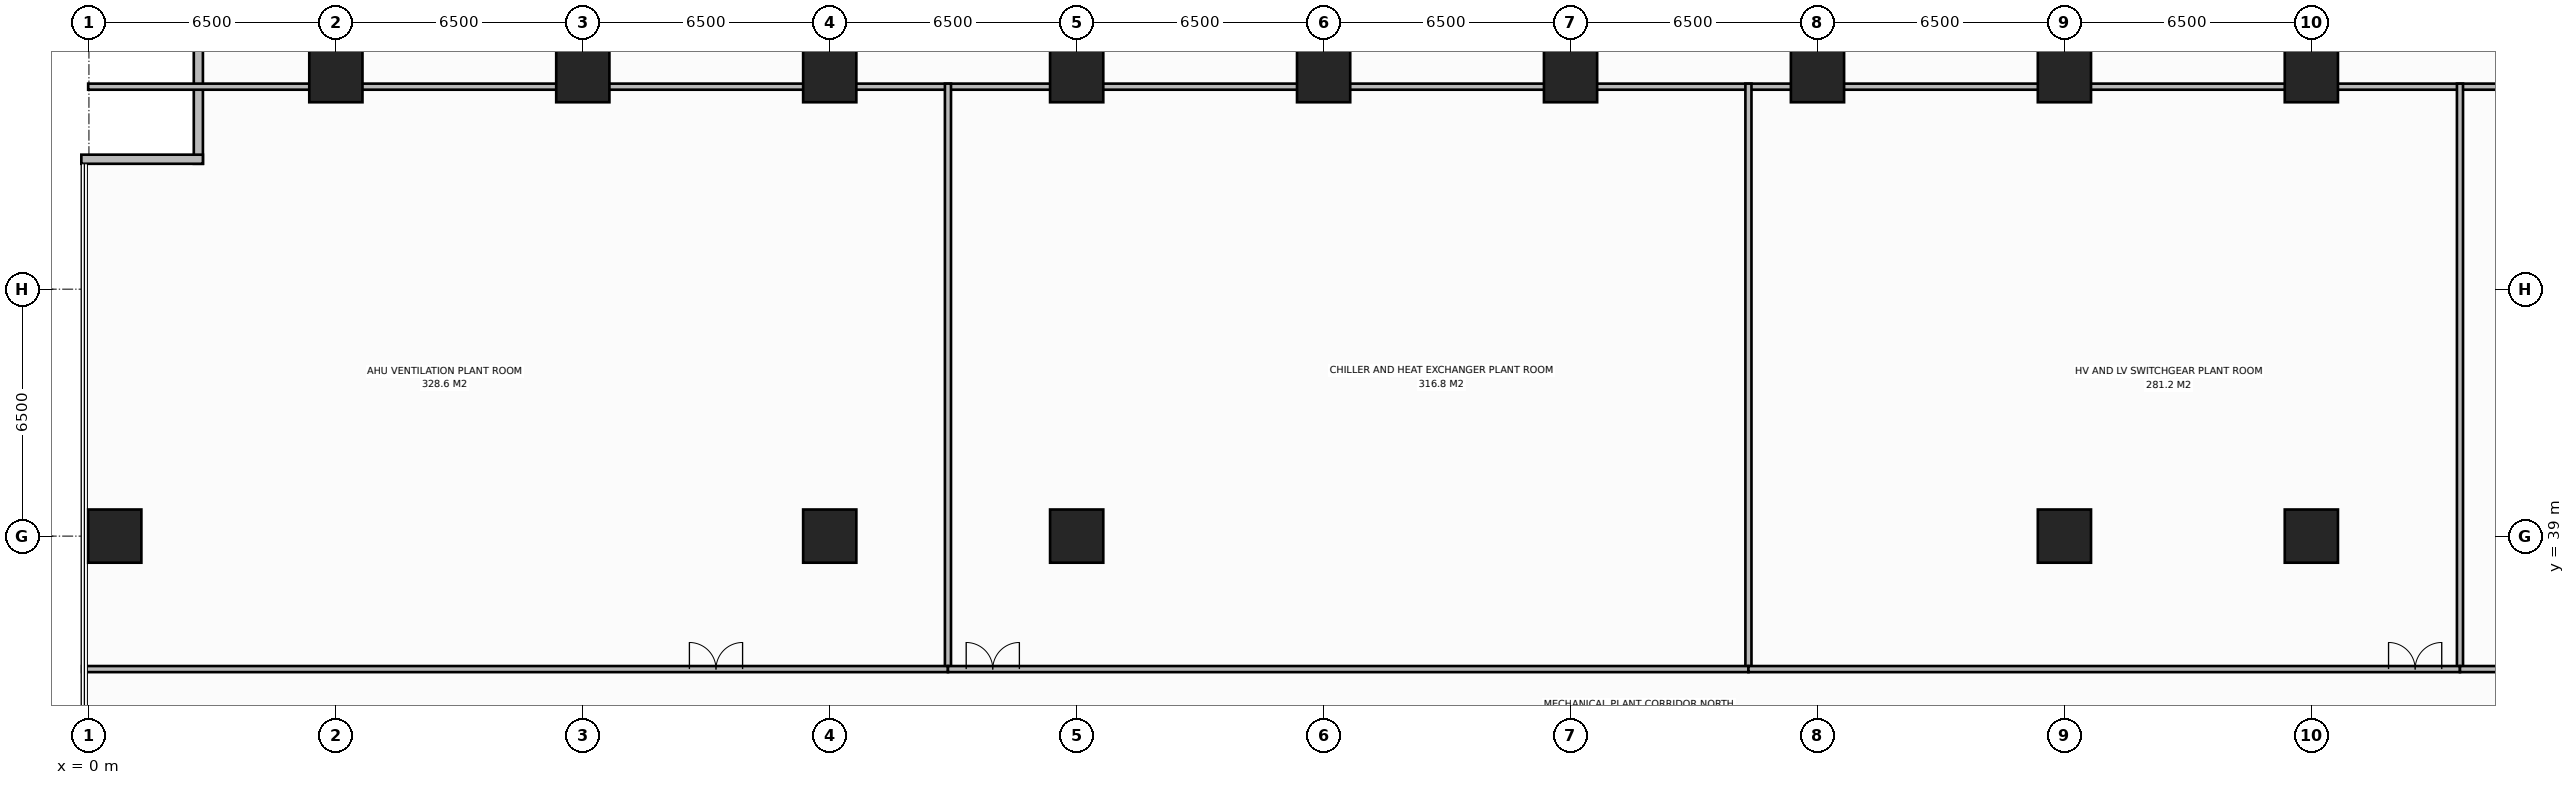
"""IFC4 building model, lengths in metres.
Left out: names, types, materials, properties, quantities, classifications, styles, units other than length and angle.
Written with IfcOpenShell. Run it as: python <this file> out.ifc"""

import sys

from ifc_helpers import new_model, si_unit, direction, frame, frame_2d, origin, origin_2d, place, context, subcontext, project, spatial, rectangle, extrude, element, fill, save


model = new_model("IFC4")
c1 = context("Model", 3, precision=1e-05, world=origin(), true_north=direction((0.0, 1.0)))
c2 = subcontext(c1, "Body", "Model", "MODEL_VIEW")
j1 = project(units=[si_unit("LENGTHUNIT", "METRE"), si_unit("PLANEANGLEUNIT", "RADIAN")], contexts=[c1])
p1 = place(None, origin())
s1 = spatial("IfcSite", under=j1, at=p1, CompositionType="ELEMENT")
p2 = place(p1, origin())
s2 = spatial("IfcBuilding", under=s1, at=p2, CompositionType="ELEMENT")
p3 = place(p2, frame((0.0, 0.0, 81.0)))
s3 = spatial("IfcBuildingStorey", under=s2, at=p3, CompositionType="ELEMENT", Elevation=81.0)
for number, where, z_axis, x_axis in (
    (1, (19.5, 39.0, 0.0), (0.0, 0.0, 1.0), (1.0, 0.0, 0.0)),
    (2, (58.5, 39.0, 0.0), (0.0, 0.0, 1.0), (1.0, 0.0, 0.0)),
    (3, (26.0, 39.0, 0.0), (0.0, 0.0, 1.0), (1.0, 0.0, 0.0)),
    (4, (52.0, 39.0, 0.0), (0.0, 0.0, 1.0), (1.0, 0.0, 0.0)),
    (5, (6.5, 51.12, 0.0), (0.0, 0.0, 1.0), (1.0, 0.0, 0.0)),
    (6, (13.0, 51.12, 0.0), (0.0, 0.0, 1.0), (1.0, 0.0, 0.0)),
    (7, (19.5, 51.12, 0.0), (0.0, 0.0, 1.0), (1.0, 0.0, 0.0)),
    (8, (26.0, 51.12, 0.0), (0.0, 0.0, 1.0), (1.0, 0.0, 0.0)),
    (9, (32.5, 51.12, 0.0), (0.0, 0.0, 1.0), (1.0, 0.0, 0.0)),
    (10, (39.0, 51.12, 0.0), (0.0, 0.0, 1.0), (1.0, 0.0, 0.0)),
    (11, (45.5, 51.12, 0.0), (0.0, 0.0, 1.0), (1.0, 0.0, 0.0)),
    (12, (52.0, 51.12, 0.0), (0.0, 0.0, 1.0), (1.0, 0.0, 0.0)),
    (13, (58.5, 51.12, 0.0), (0.0, 0.0, 1.0), (1.0, 0.0, 0.0)),
    (14, (0.68, 39.0, 0.0), (0.0, 0.0, 1.0), (1.0, 0.0, 0.0)),
):
    element("IfcColumn", number, at=place(p3, frame(where, z_axis=z_axis, x_axis=x_axis)), inside=s3, PredefinedType="COLUMN", context=c2, shape_type="SweptSolid", body=[
        extrude(rectangle(XDim=1.4, YDim=1.4, at=origin_2d()), origin(), (0.0, 0.0, 1.0), 5.0),
    ])
for number, where, z_axis, x_axis in (
    (15, (2.88, 48.8, 0.0), (0.0, 0.0, 1.0), (0.0, 1.0, 0.0)),
    (16, (-0.2, 48.92, 0.0), (0.0, 0.0, 1.0), (1.0, 0.0, 0.0)),
):
    element("IfcWall", number, at=place(p3, frame(where, z_axis=z_axis, x_axis=x_axis)), inside=s3, PredefinedType="STANDARD", context=c2, shape_type="SweptSolid", body=[
        extrude(rectangle(XDim=3.2, YDim=0.24, at=frame_2d((1.6, 0.0))), origin(), (0.0, 0.0, 1.0), 4.765),
    ])
p4 = place(p3, frame((-0.02, 50.83, 0.0), z_axis=(0.0, 0.0, 1.0), x_axis=(1.0, 0.0, 0.0)))
e17 = element("IfcWall", 17, at=p4, inside=s3, PredefinedType="STANDARD", context=c2, shape_type="SweptSolid", body=[
    extrude(rectangle(XDim=78.04, YDim=0.16, at=frame_2d((39.02, 0.0))), origin(), (0.0, 0.0, 1.0), 4.765),
])
p5 = place(p3, frame((22.612, 35.5, 0.0), z_axis=(0.0, 0.0, 1.0), x_axis=(0.0, 1.0, 0.0)))
e18 = element("IfcWall", 18, at=p5, inside=s3, PredefinedType="STANDARD", context=c2, shape_type="SweptSolid", body=[
    extrude(rectangle(XDim=15.41, YDim=0.16, at=frame_2d((7.705, 0.0))), origin(), (0.0, 0.0, 1.0), 4.765),
])
p6 = place(p3, frame((-0.18, 35.5, 0.0), z_axis=(0.0, 0.0, 1.0), x_axis=(1.0, 0.0, 0.0)))
e19 = element("IfcWall", 19, at=p6, inside=s3, PredefinedType="STANDARD", context=c2, shape_type="SweptSolid", body=[
    extrude(rectangle(XDim=22.792, YDim=0.16, at=frame_2d((11.396, 0.0))), origin(), (0.0, 0.0, 1.0), 4.765),
])
p7 = place(p6, frame((15.986, 0.0, 0.0)))
e20 = element("IfcOpeningElement", 20, at=p7, cuts=e19, PredefinedType="OPENING", context=c2, shape_type="SweptSolid", body=[
    extrude(rectangle(XDim=1.4, YDim=2.2, at=frame_2d((0.7, 1.1))), frame((0.0, 0.09, 0.0), z_axis=(0.0, -1.0, 0.0), x_axis=(1.0, 0.0, 0.0)), (0.0, 0.0, 1.0), 0.18),
])
p8 = place(p3, frame((43.682, 35.5, 0.0), z_axis=(0.0, 0.0, 1.0), x_axis=(0.0, 1.0, 0.0)))
e21 = element("IfcWall", 21, at=p8, inside=s3, PredefinedType="STANDARD", context=c2, shape_type="SweptSolid", body=[
    extrude(rectangle(XDim=15.41, YDim=0.16, at=frame_2d((7.705, 0.0))), origin(), (0.0, 0.0, 1.0), 4.765),
])
p9 = place(p3, frame((22.612, 35.5, 0.0), z_axis=(0.0, 0.0, 1.0), x_axis=(1.0, 0.0, 0.0)))
e22 = element("IfcWall", 22, at=p9, inside=s3, PredefinedType="STANDARD", context=c2, shape_type="SweptSolid", body=[
    extrude(rectangle(XDim=21.071, YDim=0.16, at=frame_2d((10.535, 0.0))), origin(), (0.0, 0.0, 1.0), 4.765),
])
p10 = place(p9, frame((0.48, 0.0, 0.0)))
e23 = element("IfcOpeningElement", 23, at=p10, cuts=e22, PredefinedType="OPENING", context=c2, shape_type="SweptSolid", body=[
    extrude(rectangle(XDim=1.4, YDim=2.2, at=frame_2d((0.7, 1.1))), frame((0.0, 0.09, 0.0), z_axis=(0.0, -1.0, 0.0), x_axis=(1.0, 0.0, 0.0)), (0.0, 0.0, 1.0), 0.18),
])
p11 = place(p3, frame((62.412, 35.5, 0.0), z_axis=(0.0, 0.0, 1.0), x_axis=(0.0, 1.0, 0.0)))
e24 = element("IfcWall", 24, at=p11, inside=s3, PredefinedType="STANDARD", context=c2, shape_type="SweptSolid", body=[
    extrude(rectangle(XDim=15.41, YDim=0.16, at=frame_2d((7.705, 0.0))), origin(), (0.0, 0.0, 1.0), 4.765),
])
p12 = place(p3, frame((43.682, 35.5, 0.0), z_axis=(0.0, 0.0, 1.0), x_axis=(1.0, 0.0, 0.0)))
e25 = element("IfcWall", 25, at=p12, inside=s3, PredefinedType="STANDARD", context=c2, shape_type="SweptSolid", body=[
    extrude(rectangle(XDim=18.73, YDim=0.16, at=frame_2d((9.365, 0.0))), origin(), (0.0, 0.0, 1.0), 4.765),
])
p13 = place(p12, frame((16.85, 0.0, 0.0)))
e26 = element("IfcOpeningElement", 26, at=p13, cuts=e25, PredefinedType="OPENING", context=c2, shape_type="SweptSolid", body=[
    extrude(rectangle(XDim=1.4, YDim=2.2, at=frame_2d((0.7, 1.1))), frame((0.0, 0.09, 0.0), z_axis=(0.0, -1.0, 0.0), x_axis=(1.0, 0.0, 0.0)), (0.0, 0.0, 1.0), 0.18),
])
p14 = place(p3, frame((62.412, 35.5, 0.0), z_axis=(0.0, 0.0, 1.0), x_axis=(1.0, 0.0, 0.0)))
e27 = element("IfcWall", 27, at=p14, inside=s3, PredefinedType="STANDARD", context=c2, shape_type="SweptSolid", body=[
    extrude(rectangle(XDim=15.768, YDim=0.16, at=frame_2d((7.884, 0.0))), origin(), (0.0, 0.0, 1.0), 4.765),
])
p15 = place(p14, frame((1.894, 0.0, 0.0)))
e28 = element("IfcOpeningElement", 28, at=p15, cuts=e27, PredefinedType="OPENING", context=c2, shape_type="SweptSolid", body=[
    extrude(rectangle(XDim=1.4, YDim=2.2, at=frame_2d((0.7, 1.1))), frame((0.0, 0.09, 0.0), z_axis=(0.0, -1.0, 0.0), x_axis=(1.0, 0.0, 0.0)), (0.0, 0.0, 1.0), 0.18),
])
p16 = place(p7, origin())
e29 = element("IfcDoor", 29, at=p16, inside=s3, OperationType="DOUBLE_DOOR_SINGLE_SWING", PredefinedType="DOOR", context=c2, shape_type="SweptSolid", body=[
    extrude(rectangle(XDim=1.4, YDim=2.2, at=frame_2d((0.7, 1.1))), frame((0.0, 0.025, 0.0), z_axis=(0.0, -1.0, 0.0), x_axis=(1.0, 0.0, 0.0)), (0.0, 0.0, 1.0), 0.05),
])
fill(e20, e29)
p17 = place(p10, origin())
e30 = element("IfcDoor", 30, at=p17, inside=s3, OperationType="DOUBLE_DOOR_SINGLE_SWING", PredefinedType="DOOR", context=c2, shape_type="SweptSolid", body=[
    extrude(rectangle(XDim=1.4, YDim=2.2, at=frame_2d((0.7, 1.1))), frame((0.0, 0.025, 0.0), z_axis=(0.0, -1.0, 0.0), x_axis=(1.0, 0.0, 0.0)), (0.0, 0.0, 1.0), 0.05),
])
fill(e23, e30)
p18 = place(p13, origin())
e31 = element("IfcDoor", 31, at=p18, inside=s3, OperationType="DOUBLE_DOOR_SINGLE_SWING", PredefinedType="DOOR", context=c2, shape_type="SweptSolid", body=[
    extrude(rectangle(XDim=1.4, YDim=2.2, at=frame_2d((0.7, 1.1))), frame((0.0, 0.025, 0.0), z_axis=(0.0, -1.0, 0.0), x_axis=(1.0, 0.0, 0.0)), (0.0, 0.0, 1.0), 0.05),
])
fill(e26, e31)
save(model, sys.argv[1])
